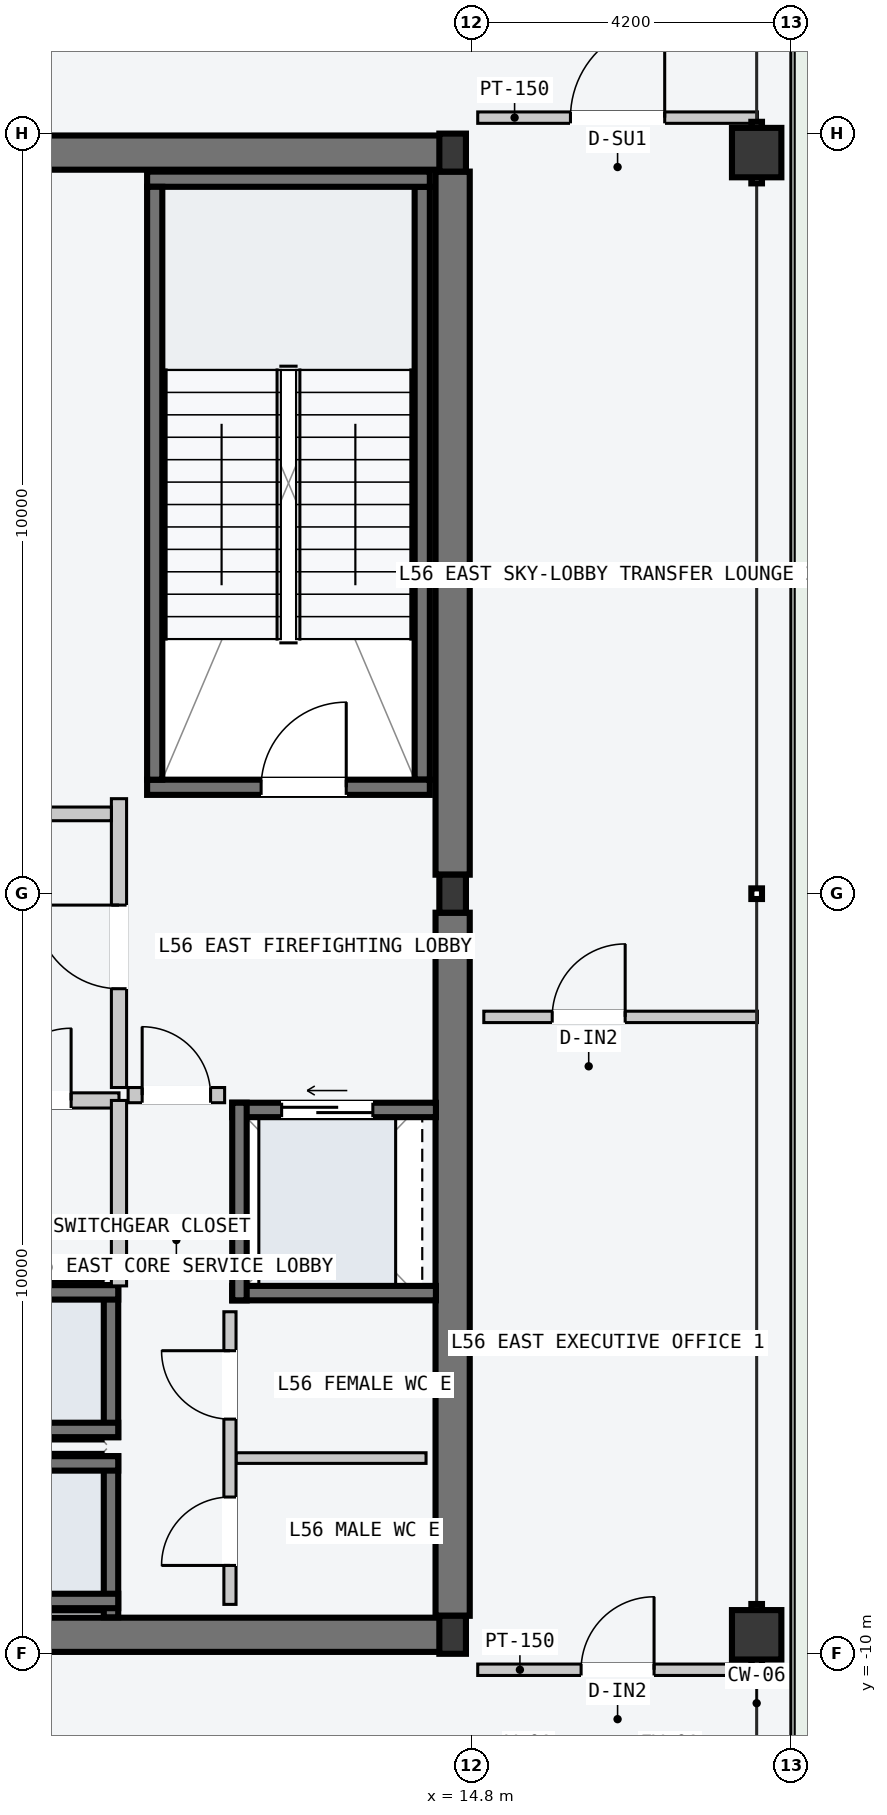
"""IFC4 building model, lengths in metres.
Left out: names, types, materials, properties, quantities, classifications, styles, units other than length and angle.
Written with IfcOpenShell. Run it as: python <this file> out.ifc"""

import sys

from ifc_helpers import new_model, si_unit, direction, frame, frame_2d, origin, origin_2d, place, context, subcontext, project, spatial, rectangle, hollow_rectangle, i_section, extrude, element, fill, save


model = new_model("IFC4")
c1 = context("Model", 3, precision=1e-05, world=origin(), true_north=direction((0.0, 1.0)))
c2 = subcontext(c1, "Body", "Model", "MODEL_VIEW")
j1 = project(units=[si_unit("LENGTHUNIT", "METRE"), si_unit("PLANEANGLEUNIT", "RADIAN")], contexts=[c1])
p1 = place(None, origin())
s1 = spatial("IfcSite", under=j1, at=p1, CompositionType="ELEMENT")
p2 = place(p1, origin())
s2 = spatial("IfcBuilding", under=s1, at=p2, CompositionType="ELEMENT")
p3 = place(p2, frame((0.0, 0.0, 213.9)))
s3 = spatial("IfcBuildingStorey", under=s2, at=p3, CompositionType="ELEMENT", Elevation=213.9)
for number, where, z_axis, x_axis in (
    (1, (8.07, -9.75, -0.2), (0.0, 0.0, 1.0), (1.0, 0.0, 0.0)),
    (2, (8.07, 9.75, -0.2), (0.0, 0.0, 1.0), (1.0, 0.0, 0.0)),
):
    element("IfcWall", number, at=place(p3, frame(where, z_axis=z_axis, x_axis=x_axis)), inside=s3, PredefinedType="SHEAR", context=c2, shape_type="SweptSolid", body=[
        extrude(rectangle(XDim=6.46, YDim=0.45, at=frame_2d((3.23, 0.0))), origin(), (0.0, 0.0, 1.0), 4.5),
    ])
for number, where, z_axis, x_axis in (
    (3, (14.55, -9.5, -0.2), (0.0, 0.0, 1.0), (0.0, 1.0, 0.0)),
    (4, (14.55, 0.25, -0.2), (0.0, 0.0, 1.0), (0.0, 1.0, 0.0)),
):
    element("IfcWall", number, at=place(p3, frame(where, z_axis=z_axis, x_axis=x_axis)), inside=s3, PredefinedType="SHEAR", context=c2, shape_type="SweptSolid", body=[
        extrude(rectangle(XDim=9.25, YDim=0.45, at=frame_2d((4.625, 0.0))), origin(), (0.0, 0.0, 1.0), 4.5),
    ])
p4 = place(p3, frame((14.15, 1.5, -0.2), z_axis=(0.0, 0.0, 1.0), x_axis=(0.0, 1.0, 0.0)))
e5 = element("IfcWall", 5, at=p4, inside=s3, PredefinedType="SOLIDWALL", context=c2, shape_type="SweptSolid", body=[
    extrude(rectangle(XDim=7.8, YDim=0.2, at=frame_2d((3.9, 0.0))), origin(), (0.0, 0.0, 1.0), 4.5),
])
p5 = place(p3, frame((10.53, 1.4, -0.2), z_axis=(0.0, 0.0, 1.0), x_axis=(1.0, 0.0, 0.0)))
e6 = element("IfcWall", 6, at=p5, inside=s3, PredefinedType="SOLIDWALL", context=c2, shape_type="SweptSolid", body=[
    extrude(rectangle(XDim=3.72, YDim=0.2, at=frame_2d((1.86, 0.0))), origin(), (0.0, 0.0, 1.0), 4.5),
])
p6 = place(p5, frame((1.5, 0.0, 0.2)))
e7 = element("IfcOpeningElement", 7, at=p6, cuts=e6, PredefinedType="OPENING", context=c2, shape_type="SweptSolid", body=[
    extrude(rectangle(XDim=1.12, YDim=2.18, at=frame_2d((0.56, 1.09))), frame((0.0, 0.11, 0.0), z_axis=(0.0, -1.0, 0.0), x_axis=(1.0, 0.0, 0.0)), (0.0, 0.0, 1.0), 0.22),
])
p7 = place(p3, frame((10.53, 9.4, -0.2), z_axis=(0.0, 0.0, 1.0), x_axis=(1.0, 0.0, 0.0)))
e8 = element("IfcWall", 8, at=p7, inside=s3, PredefinedType="SOLIDWALL", context=c2, shape_type="SweptSolid", body=[
    extrude(rectangle(XDim=3.72, YDim=0.2, at=frame_2d((1.86, 0.0))), origin(), (0.0, 0.0, 1.0), 4.5),
])
p8 = place(p3, frame((10.63, 1.5, -0.2), z_axis=(0.0, 0.0, 1.0), x_axis=(0.0, 1.0, 0.0)))
e9 = element("IfcWall", 9, at=p8, inside=s3, PredefinedType="SOLIDWALL", context=c2, shape_type="SweptSolid", body=[
    extrude(rectangle(XDim=7.8, YDim=0.2, at=frame_2d((3.9, 0.0))), origin(), (0.0, 0.0, 1.0), 4.5),
])
for number, where, z_axis, x_axis in (
    (10, (14.55, -9.75, 0.0), (0.0, 0.0, 1.0), (1.0, 0.0, 0.0)),
    (11, (14.55, 0.0, 0.0), (0.0, 0.0, 1.0), (1.0, 0.0, 0.0)),
    (12, (14.55, 9.75, 0.0), (0.0, 0.0, 1.0), (1.0, 0.0, 0.0)),
):
    element("IfcColumn", number, at=place(p3, frame(where, z_axis=z_axis, x_axis=x_axis)), inside=s3, PredefinedType="COLUMN", context=c2, shape_type="SweptSolid", body=[
        extrude(i_section(OverallWidth=0.35, OverallDepth=0.5, WebThickness=0.02, FlangeThickness=0.032, at=origin_2d()), origin(), (0.0, 0.0, 1.0), 4.5),
    ])
for number, where, z_axis, x_axis in (
    (13, (18.55, -9.75, -0.2), (0.0, 0.0, 1.0), (0.0, 1.0, 0.0)),
    (14, (18.55, 9.75, -0.2), (0.0, 0.0, 1.0), (0.0, 1.0, 0.0)),
):
    element("IfcColumn", number, at=place(p3, frame(where, z_axis=z_axis, x_axis=x_axis)), inside=s3, PredefinedType="COLUMN", context=c2, shape_type="SweptSolid", body=[
        extrude(hollow_rectangle(XDim=0.65, YDim=0.65, WallThickness=0.028, at=origin_2d()), origin(), (0.0, 0.0, 1.0), 4.7),
    ])
p9 = place(p3, frame((10.055, -9.52, -0.2), z_axis=(0.0, 0.0, 1.0), x_axis=(0.0, 1.0, 0.0)))
e15 = element("IfcWall", 15, at=p9, inside=s3, PredefinedType="SOLIDWALL", context=c2, shape_type="SweptSolid", body=[
    extrude(rectangle(XDim=2.12, YDim=0.19, at=frame_2d((1.06, 0.0))), origin(), (0.0, 0.0, 1.0), 4.5),
])
for number, where, z_axis, x_axis in (
    (16, (7.95, -7.495, -0.2), (0.0, 0.0, 1.0), (1.0, 0.0, 0.0)),
    (17, (7.95, -9.305, -0.2), (0.0, 0.0, 1.0), (1.0, 0.0, 0.0)),
):
    element("IfcWall", number, at=place(p3, frame(where, z_axis=z_axis, x_axis=x_axis)), inside=s3, PredefinedType="SOLIDWALL", context=c2, shape_type="SweptSolid", body=[
        extrude(rectangle(XDim=2.2, YDim=0.19, at=frame_2d((1.1, 0.0))), origin(), (0.0, 0.0, 1.0), 4.5),
    ])
p10 = place(p3, frame((10.055, -7.15, -0.2), z_axis=(0.0, 0.0, 1.0), x_axis=(0.0, 1.0, 0.0)))
e18 = element("IfcWall", 18, at=p10, inside=s3, PredefinedType="SOLIDWALL", context=c2, shape_type="SweptSolid", body=[
    extrude(rectangle(XDim=2.0, YDim=0.19, at=frame_2d((1.0, 0.0))), origin(), (0.0, 0.0, 1.0), 4.5),
])
for number, where, z_axis, x_axis in (
    (19, (7.95, -5.245, -0.2), (0.0, 0.0, 1.0), (1.0, 0.0, 0.0)),
    (20, (7.95, -7.055, -0.2), (0.0, 0.0, 1.0), (1.0, 0.0, 0.0)),
):
    element("IfcWall", number, at=place(p3, frame(where, z_axis=z_axis, x_axis=x_axis)), inside=s3, PredefinedType="SOLIDWALL", context=c2, shape_type="SweptSolid", body=[
        extrude(rectangle(XDim=2.2, YDim=0.19, at=frame_2d((1.1, 0.0))), origin(), (0.0, 0.0, 1.0), 4.5),
    ])
p11 = place(p3, frame((11.65, -2.845, -0.2), z_axis=(0.0, 0.0, 1.0), x_axis=(1.0, 0.0, 0.0)))
e21 = element("IfcWall", 21, at=p11, inside=s3, PredefinedType="SOLIDWALL", context=c2, shape_type="SweptSolid", body=[
    extrude(rectangle(XDim=2.68, YDim=0.19, at=frame_2d((1.34, 0.0))), origin(), (0.0, 0.0, 1.0), 4.5),
])
p12 = place(p11, frame((0.65, 0.0, 0.2)))
e22 = element("IfcOpeningElement", 22, at=p12, cuts=e21, PredefinedType="OPENING", context=c2, shape_type="SweptSolid", body=[
    extrude(rectangle(XDim=1.2, YDim=2.2, at=frame_2d((0.6, 1.1))), frame((0.0, 0.105, 0.0), z_axis=(0.0, -1.0, 0.0), x_axis=(1.0, 0.0, 0.0)), (0.0, 0.0, 1.0), 0.21),
])
p13 = place(p3, frame((11.65, -5.255, -0.2), z_axis=(0.0, 0.0, 1.0), x_axis=(1.0, 0.0, 0.0)))
e23 = element("IfcWall", 23, at=p13, inside=s3, PredefinedType="SOLIDWALL", context=c2, shape_type="SweptSolid", body=[
    extrude(rectangle(XDim=2.68, YDim=0.19, at=frame_2d((1.34, 0.0))), origin(), (0.0, 0.0, 1.0), 4.5),
])
p14 = place(p3, frame((11.745, -5.35, -0.2), z_axis=(0.0, 0.0, 1.0), x_axis=(0.0, 1.0, 0.0)))
e24 = element("IfcWall", 24, at=p14, inside=s3, PredefinedType="SOLIDWALL", context=c2, shape_type="SweptSolid", body=[
    extrude(rectangle(XDim=2.6, YDim=0.19, at=frame_2d((1.3, 0.0))), origin(), (0.0, 0.0, 1.0), 4.5),
])
p15 = place(p3, frame((10.16, -2.55, 0.0), z_axis=(0.0, 0.0, 1.0), x_axis=(0.0, 1.0, 0.0)))
e25 = element("IfcWall", 25, at=p15, inside=s3, PredefinedType="PARTITIONING", context=c2, shape_type="SweptSolid", body=[
    extrude(rectangle(XDim=3.8, YDim=0.2, at=frame_2d((1.9, 0.0))), origin(), (0.0, 0.0, 1.0), 4.3),
])
p16 = place(p15, frame((1.3, 0.0, 0.0)))
e26 = element("IfcOpeningElement", 26, at=p16, cuts=e25, PredefinedType="OPENING", context=c2, shape_type="SweptSolid", body=[
    extrude(rectangle(XDim=1.1, YDim=2.15, at=frame_2d((0.55, 1.075))), frame((0.0, 0.11, 0.0), z_axis=(0.0, -1.0, 0.0), x_axis=(1.0, 0.0, 0.0)), (0.0, 0.0, 1.0), 0.22),
])
p17 = place(p3, frame((10.28, -2.65, 0.0), z_axis=(0.0, 0.0, 1.0), x_axis=(1.0, 0.0, 0.0)))
e27 = element("IfcWall", 27, at=p17, inside=s3, PredefinedType="PARTITIONING", context=c2, shape_type="SweptSolid", body=[
    extrude(rectangle(XDim=1.27, YDim=0.2, at=frame_2d((0.635, 0.0))), origin(), (0.0, 0.0, 1.0), 4.3),
])
p18 = place(p17, frame((0.185, 0.0, 0.0)))
e28 = element("IfcOpeningElement", 28, at=p18, cuts=e27, PredefinedType="OPENING", context=c2, shape_type="SweptSolid", body=[
    extrude(rectangle(XDim=0.9, YDim=2.15, at=frame_2d((0.45, 1.075))), frame((0.0, 0.11, 0.0), z_axis=(0.0, -1.0, 0.0), x_axis=(1.0, 0.0, 0.0)), (0.0, 0.0, 1.0), 0.22),
])
p19 = place(p3, frame((7.96, -2.72, 0.0), z_axis=(0.0, 0.0, 1.0), x_axis=(1.0, 0.0, 0.0)))
e29 = element("IfcWall", 29, at=p19, inside=s3, PredefinedType="PARTITIONING", context=c2, shape_type="SweptSolid", body=[
    extrude(rectangle(XDim=2.2, YDim=0.2, at=frame_2d((1.1, 0.0))), origin(), (0.0, 0.0, 1.0), 4.3),
])
p20 = place(p19, frame((0.62, 0.0, 0.0)))
e30 = element("IfcOpeningElement", 30, at=p20, cuts=e29, PredefinedType="OPENING", context=c2, shape_type="SweptSolid", body=[
    extrude(rectangle(XDim=0.95, YDim=2.1, at=frame_2d((0.475, 1.05))), frame((0.0, 0.11, 0.0), z_axis=(0.0, -1.0, 0.0), x_axis=(1.0, 0.0, 0.0)), (0.0, 0.0, 1.0), 0.22),
])
p21 = place(p3, frame((10.16, -5.16, 0.0), z_axis=(0.0, 0.0, 1.0), x_axis=(0.0, 1.0, 0.0)))
e31 = element("IfcWall", 31, at=p21, inside=s3, PredefinedType="PARTITIONING", context=c2, shape_type="SweptSolid", body=[
    extrude(rectangle(XDim=2.44, YDim=0.2, at=frame_2d((1.22, 0.0))), origin(), (0.0, 0.0, 1.0), 4.3),
])
p22 = place(p3, frame((11.7, -7.425, 0.0), z_axis=(0.0, 0.0, 1.0), x_axis=(1.0, 0.0, 0.0)))
e32 = element("IfcWall", 32, at=p22, inside=s3, PredefinedType="PARTITIONING", context=c2, shape_type="SweptSolid", body=[
    extrude(rectangle(XDim=2.5, YDim=0.14, at=frame_2d((1.25, 0.0))), origin(), (0.0, 0.0, 1.0), 4.3),
])
p23 = place(p3, frame((11.62, -9.35, 0.0), z_axis=(0.0, 0.0, 1.0), x_axis=(0.0, 1.0, 0.0)))
e33 = element("IfcWall", 33, at=p23, inside=s3, PredefinedType="PARTITIONING", context=c2, shape_type="SweptSolid", body=[
    extrude(rectangle(XDim=3.85, YDim=0.16, at=frame_2d((1.925, 0.0))), origin(), (0.0, 0.0, 1.0), 4.3),
])
p24 = place(p23, frame((0.512, 0.0, 0.0)))
e34 = element("IfcOpeningElement", 34, at=p24, cuts=e33, PredefinedType="OPENING", context=c2, shape_type="SweptSolid", body=[
    extrude(rectangle(XDim=0.9, YDim=2.15, at=frame_2d((0.45, 1.075))), frame((0.0, 0.09, 0.0), z_axis=(0.0, -1.0, 0.0), x_axis=(1.0, 0.0, 0.0)), (0.0, 0.0, 1.0), 0.18),
])
p25 = place(p23, frame((2.438, 0.0, 0.0)))
e35 = element("IfcOpeningElement", 35, at=p25, cuts=e33, PredefinedType="OPENING", context=c2, shape_type="SweptSolid", body=[
    extrude(rectangle(XDim=0.9, YDim=2.15, at=frame_2d((0.45, 1.075))), frame((0.0, 0.09, 0.0), z_axis=(0.0, -1.0, 0.0), x_axis=(1.0, 0.0, 0.0)), (0.0, 0.0, 1.0), 0.18),
])
p26 = place(p3, frame((3.01, 1.05, 0.0), z_axis=(0.0, 0.0, 1.0), x_axis=(1.0, 0.0, 0.0)))
e36 = element("IfcWall", 36, at=p26, inside=s3, PredefinedType="PARTITIONING", context=c2, shape_type="SweptSolid", body=[
    extrude(rectangle(XDim=7.05, YDim=0.18, at=frame_2d((3.525, 0.0))), origin(), (0.0, 0.0, 1.0), 4.3),
])
p27 = place(p3, frame((14.88, 10.21, 0.0), z_axis=(0.0, 0.0, 1.0), x_axis=(1.0, 0.0, 0.0)))
e37 = element("IfcWall", 37, at=p27, inside=s3, PredefinedType="PARTITIONING", context=c2, shape_type="SweptSolid", body=[
    extrude(rectangle(XDim=3.68, YDim=0.15, at=frame_2d((1.84, 0.0))), origin(), (0.0, 0.0, 1.0), 4.3),
])
p28 = place(p27, frame((1.22, 0.0, 0.0)))
e38 = element("IfcOpeningElement", 38, at=p28, cuts=e37, PredefinedType="OPENING", context=c2, shape_type="SweptSolid", body=[
    extrude(rectangle(XDim=1.24, YDim=2.24, at=frame_2d((0.62, 1.12))), frame((0.0, 0.085, 0.0), z_axis=(0.0, -1.0, 0.0), x_axis=(1.0, 0.0, 0.0)), (0.0, 0.0, 1.0), 0.17),
])
p29 = place(p3, frame((14.88, -10.21, 0.0), z_axis=(0.0, 0.0, 1.0), x_axis=(1.0, 0.0, 0.0)))
e39 = element("IfcWall", 39, at=p29, inside=s3, PredefinedType="PARTITIONING", context=c2, shape_type="SweptSolid", body=[
    extrude(rectangle(XDim=3.68, YDim=0.15, at=frame_2d((1.84, 0.0))), origin(), (0.0, 0.0, 1.0), 4.3),
])
p30 = place(p29, frame((1.36, 0.0, 0.0)))
e40 = element("IfcOpeningElement", 40, at=p30, cuts=e39, PredefinedType="OPENING", context=c2, shape_type="SweptSolid", body=[
    extrude(rectangle(XDim=0.96, YDim=2.18, at=frame_2d((0.48, 1.09))), frame((0.0, 0.085, 0.0), z_axis=(0.0, -1.0, 0.0), x_axis=(1.0, 0.0, 0.0)), (0.0, 0.0, 1.0), 0.17),
])
p31 = place(p3, frame((14.96, -1.621, 0.0), z_axis=(0.0, 0.0, 1.0), x_axis=(1.0, 0.0, 0.0)))
e41 = element("IfcWall", 41, at=p31, inside=s3, PredefinedType="PARTITIONING", context=c2, shape_type="SweptSolid", body=[
    extrude(rectangle(XDim=3.6, YDim=0.15, at=frame_2d((1.8, 0.0))), origin(), (0.0, 0.0, 1.0), 4.3),
])
p32 = place(p31, frame((0.9, 0.0, 0.0)))
e42 = element("IfcOpeningElement", 42, at=p32, cuts=e41, PredefinedType="OPENING", context=c2, shape_type="SweptSolid", body=[
    extrude(rectangle(XDim=0.96, YDim=2.18, at=frame_2d((0.48, 1.09))), frame((0.0, 0.085, 0.0), z_axis=(0.0, -1.0, 0.0), x_axis=(1.0, 0.0, 0.0)), (0.0, 0.0, 1.0), 0.17),
])
p33 = place(p6, origin())
e43 = element("IfcDoor", 43, at=p33, inside=s3, OperationType="SINGLE_SWING_RIGHT", PredefinedType="DOOR", context=c2, shape_type="SweptSolid", body=[
    extrude(rectangle(XDim=1.12, YDim=2.18, at=frame_2d((0.56, 1.09))), frame((0.0, 0.025, 0.0), z_axis=(0.0, -1.0, 0.0), x_axis=(1.0, 0.0, 0.0)), (0.0, 0.0, 1.0), 0.05),
])
fill(e7, e43)
p34 = place(p12, origin())
e44 = element("IfcDoor", 44, at=p34, inside=s3, OperationType="SLIDING_TO_LEFT", PredefinedType="DOOR", context=c2, shape_type="SweptSolid", body=[
    extrude(rectangle(XDim=1.2, YDim=2.2, at=frame_2d((0.6, 1.1))), frame((0.0, 0.025, 0.0), z_axis=(0.0, -1.0, 0.0), x_axis=(1.0, 0.0, 0.0)), (0.0, 0.0, 1.0), 0.05),
])
fill(e22, e44)
p35 = place(p16, origin())
e45 = element("IfcDoor", 45, at=p35, inside=s3, OperationType="SINGLE_SWING_RIGHT", PredefinedType="DOOR", context=c2, shape_type="SweptSolid", body=[
    extrude(rectangle(XDim=1.1, YDim=2.15, at=frame_2d((0.55, 1.075))), frame((0.0, 0.025, 0.0), z_axis=(0.0, -1.0, 0.0), x_axis=(1.0, 0.0, 0.0)), (0.0, 0.0, 1.0), 0.05),
])
fill(e26, e45)
p36 = place(p18, origin())
e46 = element("IfcDoor", 46, at=p36, inside=s3, OperationType="SINGLE_SWING_LEFT", PredefinedType="DOOR", context=c2, shape_type="SweptSolid", body=[
    extrude(rectangle(XDim=0.9, YDim=2.15, at=frame_2d((0.45, 1.075))), frame((0.0, 0.025, 0.0), z_axis=(0.0, -1.0, 0.0), x_axis=(1.0, 0.0, 0.0)), (0.0, 0.0, 1.0), 0.05),
])
fill(e28, e46)
p37 = place(p20, origin())
e47 = element("IfcDoor", 47, at=p37, inside=s3, OperationType="SINGLE_SWING_RIGHT", PredefinedType="DOOR", context=c2, shape_type="SweptSolid", body=[
    extrude(rectangle(XDim=0.95, YDim=2.1, at=frame_2d((0.475, 1.05))), frame((0.0, 0.025, 0.0), z_axis=(0.0, -1.0, 0.0), x_axis=(1.0, 0.0, 0.0)), (0.0, 0.0, 1.0), 0.05),
])
fill(e30, e47)
p38 = place(p24, origin())
e48 = element("IfcDoor", 48, at=p38, inside=s3, OperationType="SINGLE_SWING_LEFT", PredefinedType="DOOR", context=c2, shape_type="SweptSolid", body=[
    extrude(rectangle(XDim=0.9, YDim=2.15, at=frame_2d((0.45, 1.075))), frame((0.0, 0.025, 0.0), z_axis=(0.0, -1.0, 0.0), x_axis=(1.0, 0.0, 0.0)), (0.0, 0.0, 1.0), 0.05),
])
fill(e34, e48)
p39 = place(p25, origin())
e49 = element("IfcDoor", 49, at=p39, inside=s3, OperationType="SINGLE_SWING_RIGHT", PredefinedType="DOOR", context=c2, shape_type="SweptSolid", body=[
    extrude(rectangle(XDim=0.9, YDim=2.15, at=frame_2d((0.45, 1.075))), frame((0.0, 0.025, 0.0), z_axis=(0.0, -1.0, 0.0), x_axis=(1.0, 0.0, 0.0)), (0.0, 0.0, 1.0), 0.05),
])
fill(e35, e49)
p40 = place(p28, origin())
e50 = element("IfcDoor", 50, at=p40, inside=s3, OperationType="SINGLE_SWING_RIGHT", PredefinedType="DOOR", context=c2, shape_type="SweptSolid", body=[
    extrude(rectangle(XDim=1.24, YDim=2.24, at=frame_2d((0.62, 1.12))), frame((0.0, 0.025, 0.0), z_axis=(0.0, -1.0, 0.0), x_axis=(1.0, 0.0, 0.0)), (0.0, 0.0, 1.0), 0.05),
])
fill(e38, e50)
p41 = place(p30, origin())
e51 = element("IfcDoor", 51, at=p41, inside=s3, OperationType="SINGLE_SWING_RIGHT", PredefinedType="DOOR", context=c2, shape_type="SweptSolid", body=[
    extrude(rectangle(XDim=0.96, YDim=2.18, at=frame_2d((0.48, 1.09))), frame((0.0, 0.025, 0.0), z_axis=(0.0, -1.0, 0.0), x_axis=(1.0, 0.0, 0.0)), (0.0, 0.0, 1.0), 0.05),
])
fill(e40, e51)
p42 = place(p32, origin())
e52 = element("IfcDoor", 52, at=p42, inside=s3, OperationType="SINGLE_SWING_RIGHT", PredefinedType="DOOR", context=c2, shape_type="SweptSolid", body=[
    extrude(rectangle(XDim=0.96, YDim=2.18, at=frame_2d((0.48, 1.09))), frame((0.0, 0.025, 0.0), z_axis=(0.0, -1.0, 0.0), x_axis=(1.0, 0.0, 0.0)), (0.0, 0.0, 1.0), 0.05),
])
fill(e42, e52)
save(model, sys.argv[1])
